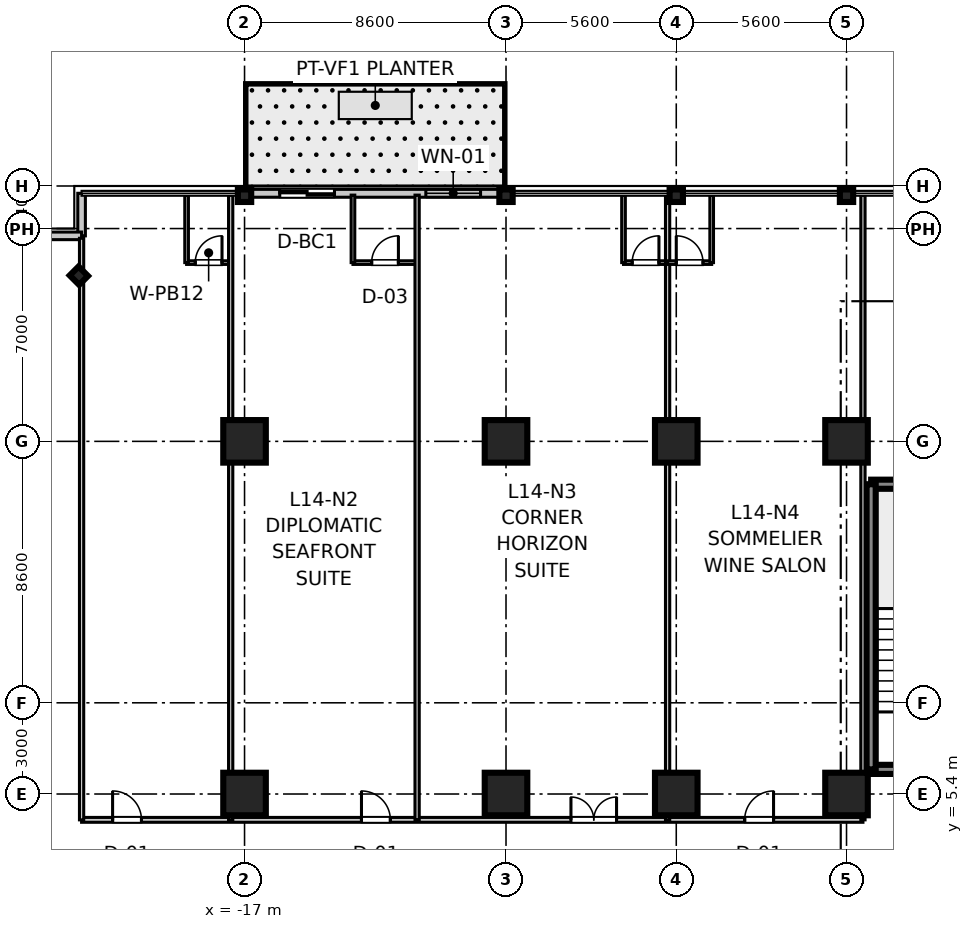
"""IFC4 building model, lengths in metres.
Left out: names, types, materials, properties, quantities, classifications, styles, units other than length and angle.
Written with IfcOpenShell. Run it as: python <this file> out.ifc"""

import sys

from ifc_helpers import new_model, si_unit, direction, frame, frame_2d, origin, origin_2d, place, context, subcontext, project, spatial, rectangle, i_section, extrude, source, transform, mapped, element, fill, save


model = new_model("IFC4")
c1 = context("Model", 3, precision=1e-05, world=origin(), true_north=direction((0.0, 1.0)))
c2 = subcontext(c1, "Body", "Model", "MODEL_VIEW")
j1 = project(units=[si_unit("LENGTHUNIT", "METRE"), si_unit("PLANEANGLEUNIT", "RADIAN")], contexts=[c1])
p1 = place(None, origin())
s1 = spatial("IfcSite", under=j1, at=p1, CompositionType="ELEMENT")
p2 = place(p1, origin())
s2 = spatial("IfcBuilding", under=s1, at=p2, CompositionType="ELEMENT")
p3 = place(p2, frame((0.0, 0.0, 61.6)))
s3 = spatial("IfcBuildingStorey", under=s2, at=p3, CompositionType="ELEMENT", Elevation=61.6)
m1 = source(origin(), c2, "Body", "SweptSolid", [
    extrude(rectangle(XDim=1.4, YDim=1.4, at=origin_2d()), origin(), (0.0, 0.0, 1.0), 3.605),
])
for number, where, z_axis, x_axis in (
    (1, (-17.0, 5.4, 0.0), (0.0, 0.0, 1.0), (1.0, 0.0, 0.0)),
    (2, (-17.0, 17.0, 0.0), (0.0, 0.0, 1.0), (1.0, 0.0, 0.0)),
    (3, (-8.4, 5.4, 0.0), (0.0, 0.0, 1.0), (1.0, 0.0, 0.0)),
    (4, (-8.4, 17.0, 0.0), (0.0, 0.0, 1.0), (1.0, 0.0, 0.0)),
    (5, (-2.8, 5.4, 0.0), (0.0, 0.0, 1.0), (1.0, 0.0, 0.0)),
    (6, (-2.8, 17.0, 0.0), (0.0, 0.0, 1.0), (1.0, 0.0, 0.0)),
    (7, (2.8, 5.4, 0.0), (0.0, 0.0, 1.0), (1.0, 0.0, 0.0)),
    (8, (2.8, 17.0, 0.0), (0.0, 0.0, 1.0), (1.0, 0.0, 0.0)),
):
    element("IfcColumn", number, at=place(p3, frame(where, z_axis=z_axis, x_axis=x_axis)), inside=s3, PredefinedType="COLUMN", context=c2, shape_type="MappedRepresentation", body=[
        mapped(m1, transform((0.0, 0.0, 0.0), scale=1.0)),
    ])
m2 = source(origin(), c2, "Body", "SweptSolid", [
    extrude(i_section(OverallWidth=0.412, OverallDepth=0.438, WebThickness=0.023, FlangeThickness=0.036, at=origin_2d()), origin(), (0.0, 0.0, 1.0), 3.605),
])
for number, where, z_axis, x_axis in (
    (9, (-17.0, 25.08, 0.0), (0.0, 0.0, 1.0), (0.0, 1.0, 0.0)),
    (10, (-8.4, 25.08, 0.0), (0.0, 0.0, 1.0), (0.0, 1.0, 0.0)),
    (11, (-2.8, 25.08, 0.0), (0.0, 0.0, 1.0), (0.0, 1.0, 0.0)),
    (12, (2.8, 25.08, 0.0), (0.0, 0.0, 1.0), (0.0, 1.0, 0.0)),
    (13, (-22.45, 22.45, 0.0), (0.0, 0.0, 1.0), (0.707, 0.707, 0.0)),
):
    element("IfcColumn", number, at=place(p3, frame(where, z_axis=z_axis, x_axis=x_axis)), inside=s3, PredefinedType="COLUMN", context=c2, shape_type="MappedRepresentation", body=[
        mapped(m2, transform((0.0, 0.0, 0.0), scale=1.0)),
    ])
m3 = source(origin(), c2, "Body", "SweptSolid", [
    extrude(rectangle(XDim=3.98, YDim=0.3, at=frame_2d((1.99, 0.0))), origin(), (0.0, 0.0, 1.0), 3.37),
])
for number, where, z_axis, x_axis in (
    (14, (3.61, 6.21, 0.0), (0.0, 0.0, 1.0), (1.0, 0.0, 0.0)),
    (15, (3.61, 15.59, 0.0), (0.0, 0.0, 1.0), (1.0, 0.0, 0.0)),
):
    element("IfcWall", number, at=place(p3, frame(where, z_axis=z_axis, x_axis=x_axis)), inside=s3, PredefinedType="SHEAR", context=c2, shape_type="MappedRepresentation", body=[
        mapped(m3, transform((0.0, 0.0, 0.0), scale=1.0)),
    ])
m4 = source(origin(), c2, "Body", "SweptSolid", [
    extrude(rectangle(XDim=9.38, YDim=0.3, at=frame_2d((4.69, 0.0))), origin(), (0.0, 0.0, 1.0), 3.37),
])
p4 = place(p3, frame((3.61, 6.21, 0.0), z_axis=(0.0, 0.0, 1.0), x_axis=(0.0, 1.0, 0.0)))
e16 = element("IfcWall", 16, at=p4, inside=s3, PredefinedType="SHEAR", context=c2, shape_type="MappedRepresentation", body=[
    mapped(m4, transform((0.0, 0.0, 0.0), scale=1.0)),
])
m5 = source(origin(), c2, "Body", "SweptSolid", [
    extrude(rectangle(XDim=1.4, YDim=0.25, at=frame_2d((0.7, 0.0))), origin(), (0.0, 0.0, 1.0), 3.37),
])
for number, where, z_axis, x_axis in (
    (17, (-22.36, 23.76, 0.0), (0.0, 0.0, 1.0), (0.0, 1.0, 0.0)),
    (18, (-23.76, 23.76, 0.0), (0.0, 0.0, 1.0), (1.0, 0.0, 0.0)),
):
    element("IfcWall", number, at=place(p3, frame(where, z_axis=z_axis, x_axis=x_axis)), inside=s3, PredefinedType="STANDARD", context=c2, shape_type="MappedRepresentation", body=[
        mapped(m5, transform((0.0, 0.0, 0.0), scale=1.0)),
    ])
m6 = source(origin(), c2, "Body", "SweptSolid", [
    extrude(rectangle(XDim=8.6, YDim=0.26, at=frame_2d((4.3, 0.0))), origin(), (0.0, 0.0, 1.0), 2.85),
])
p5 = place(p3, frame((-17.0, 25.16, 0.0), z_axis=(0.0, 0.0, 1.0), x_axis=(1.0, 0.0, 0.0)))
e19 = element("IfcWall", 19, at=p5, inside=s3, PredefinedType="STANDARD", context=c2, shape_type="MappedRepresentation", body=[
    mapped(m6, transform((0.0, 0.0, 0.0), scale=1.0)),
])
p6 = place(p5, frame((1.158, 0.0, 0.0)))
e20 = element("IfcOpeningElement", 20, at=p6, cuts=e19, PredefinedType="OPENING", context=c2, shape_type="SweptSolid", body=[
    extrude(rectangle(XDim=1.8, YDim=2.25, at=frame_2d((0.9, 1.125))), frame((0.0, 0.14, 0.0), z_axis=(0.0, -1.0, 0.0), x_axis=(1.0, 0.0, 0.0)), (0.0, 0.0, 1.0), 0.28),
])
p7 = place(p5, frame((5.963, 0.0, 0.85)))
e21 = element("IfcOpeningElement", 21, at=p7, cuts=e19, PredefinedType="OPENING", context=c2, shape_type="SweptSolid", body=[
    extrude(rectangle(XDim=1.8, YDim=1.5, at=frame_2d((0.9, 0.75))), frame((0.0, 0.14, 0.0), z_axis=(0.0, -1.0, 0.0), x_axis=(1.0, 0.0, 0.0)), (0.0, 0.0, 1.0), 0.28),
])
m7 = source(origin(), c2, "Body", "SweptSolid", [
    extrude(rectangle(XDim=25.7, YDim=0.16, at=frame_2d((12.85, 0.0))), origin(), (0.0, 0.0, 1.0), 2.71),
])
p8 = place(p3, frame((-22.36, 4.55, 0.0), z_axis=(0.0, 0.0, 1.0), x_axis=(1.0, 0.0, 0.0)))
e22 = element("IfcWall", 22, at=p8, inside=s3, PredefinedType="PARTITIONING", context=c2, shape_type="MappedRepresentation", body=[
    mapped(m7, transform((0.0, 0.0, 0.0), scale=1.0)),
])
p9 = place(p8, frame((1.02, 0.0, 0.0)))
e23 = element("IfcOpeningElement", 23, at=p9, cuts=e22, PredefinedType="OPENING", context=c2, shape_type="SweptSolid", body=[
    extrude(rectangle(XDim=0.95, YDim=2.1, at=frame_2d((0.475, 1.05))), frame((0.0, 0.09, 0.0), z_axis=(0.0, -1.0, 0.0), x_axis=(1.0, 0.0, 0.0)), (0.0, 0.0, 1.0), 0.18),
])
p10 = place(p8, frame((9.206, 0.0, 0.0)))
e24 = element("IfcOpeningElement", 24, at=p10, cuts=e22, PredefinedType="OPENING", context=c2, shape_type="SweptSolid", body=[
    extrude(rectangle(XDim=0.95, YDim=2.1, at=frame_2d((0.475, 1.05))), frame((0.0, 0.09, 0.0), z_axis=(0.0, -1.0, 0.0), x_axis=(1.0, 0.0, 0.0)), (0.0, 0.0, 1.0), 0.18),
])
p11 = place(p8, frame((16.096, 0.0, 0.0)))
e25 = element("IfcOpeningElement", 25, at=p11, cuts=e22, PredefinedType="OPENING", context=c2, shape_type="SweptSolid", body=[
    extrude(rectangle(XDim=1.5, YDim=2.15, at=frame_2d((0.75, 1.075))), frame((0.0, 0.09, 0.0), z_axis=(0.0, -1.0, 0.0), x_axis=(1.0, 0.0, 0.0)), (0.0, 0.0, 1.0), 0.18),
])
p12 = place(p8, frame((21.81, 0.0, 0.0)))
e26 = element("IfcOpeningElement", 26, at=p12, cuts=e22, PredefinedType="OPENING", context=c2, shape_type="SweptSolid", body=[
    extrude(rectangle(XDim=0.95, YDim=2.1, at=frame_2d((0.475, 1.05))), frame((0.0, 0.09, 0.0), z_axis=(0.0, -1.0, 0.0), x_axis=(1.0, 0.0, 0.0)), (0.0, 0.0, 1.0), 0.18),
])
m8 = source(origin(), c2, "Body", "SweptSolid", [
    extrude(rectangle(XDim=19.13, YDim=0.14, at=frame_2d((9.565, 0.0))), origin(), (0.0, 0.0, 1.0), 2.71),
])
p13 = place(p3, frame((-22.36, 4.55, 0.0), z_axis=(0.0, 0.0, 1.0), x_axis=(0.0, 1.0, 0.0)))
e27 = element("IfcWall", 27, at=p13, inside=s3, PredefinedType="PARTITIONING", context=c2, shape_type="MappedRepresentation", body=[
    mapped(m8, transform((0.0, 0.0, 0.0), scale=1.0)),
])
m9 = source(origin(), c2, "Body", "SweptSolid", [
    extrude(rectangle(XDim=20.55, YDim=0.14, at=frame_2d((10.275, 0.0))), origin(), (0.0, 0.0, 1.0), 2.71),
])
p14 = place(p3, frame((3.34, 4.55, 0.0), z_axis=(0.0, 0.0, 1.0), x_axis=(0.0, 1.0, 0.0)))
e28 = element("IfcWall", 28, at=p14, inside=s3, PredefinedType="PARTITIONING", context=c2, shape_type="MappedRepresentation", body=[
    mapped(m9, transform((0.0, 0.0, 0.0), scale=1.0)),
])
m10 = source(origin(), c2, "Body", "SweptSolid", [
    extrude(rectangle(XDim=1.45, YDim=0.12, at=frame_2d((0.725, 0.0))), origin(), (0.0, 0.0, 1.0), 2.71),
])
p15 = place(p3, frame((-18.906, 22.88, 0.0), z_axis=(0.0, 0.0, 1.0), x_axis=(1.0, 0.0, 0.0)))
e29 = element("IfcWall", 29, at=p15, inside=s3, PredefinedType="PARTITIONING", context=c2, shape_type="MappedRepresentation", body=[
    mapped(m10, transform((0.0, 0.0, 0.0), scale=1.0)),
])
p16 = place(p15, frame((0.285, 0.0, 0.0)))
e30 = element("IfcOpeningElement", 30, at=p16, cuts=e29, PredefinedType="OPENING", context=c2, shape_type="SweptSolid", body=[
    extrude(rectangle(XDim=0.88, YDim=2.1, at=frame_2d((0.44, 1.05))), frame((0.0, 0.07, 0.0), z_axis=(0.0, -1.0, 0.0), x_axis=(1.0, 0.0, 0.0)), (0.0, 0.0, 1.0), 0.14),
])
m11 = source(origin(), c2, "Body", "SweptSolid", [
    extrude(rectangle(XDim=2.22, YDim=0.12, at=frame_2d((1.11, 0.0))), origin(), (0.0, 0.0, 1.0), 2.71),
])
p17 = place(p3, frame((-18.906, 22.88, 0.0), z_axis=(0.0, 0.0, 1.0), x_axis=(0.0, 1.0, 0.0)))
e31 = element("IfcWall", 31, at=p17, inside=s3, PredefinedType="PARTITIONING", context=c2, shape_type="MappedRepresentation", body=[
    mapped(m11, transform((0.0, 0.0, 0.0), scale=1.0)),
])
p18 = place(p3, frame((-17.456, 4.55, 0.0), z_axis=(0.0, 0.0, 1.0), x_axis=(0.0, 1.0, 0.0)))
e32 = element("IfcWall", 32, at=p18, inside=s3, PredefinedType="PARTITIONING", context=c2, shape_type="MappedRepresentation", body=[
    mapped(m9, transform((0.0, 0.0, 0.0), scale=1.0)),
])
m12 = source(origin(), c2, "Body", "SweptSolid", [
    extrude(rectangle(XDim=2.11, YDim=0.12, at=frame_2d((1.055, 0.0))), origin(), (0.0, 0.0, 1.0), 2.71),
])
p19 = place(p3, frame((-13.434, 22.88, 0.0), z_axis=(0.0, 0.0, 1.0), x_axis=(1.0, 0.0, 0.0)))
e33 = element("IfcWall", 33, at=p19, inside=s3, PredefinedType="PARTITIONING", context=c2, shape_type="MappedRepresentation", body=[
    mapped(m12, transform((0.0, 0.0, 0.0), scale=1.0)),
])
p20 = place(p19, frame((0.615, 0.0, 0.0)))
e34 = element("IfcOpeningElement", 34, at=p20, cuts=e33, PredefinedType="OPENING", context=c2, shape_type="SweptSolid", body=[
    extrude(rectangle(XDim=0.88, YDim=2.1, at=frame_2d((0.44, 1.05))), frame((0.0, 0.07, 0.0), z_axis=(0.0, -1.0, 0.0), x_axis=(1.0, 0.0, 0.0)), (0.0, 0.0, 1.0), 0.14),
])
p21 = place(p3, frame((-13.434, 22.88, 0.0), z_axis=(0.0, 0.0, 1.0), x_axis=(0.0, 1.0, 0.0)))
e35 = element("IfcWall", 35, at=p21, inside=s3, PredefinedType="PARTITIONING", context=c2, shape_type="MappedRepresentation", body=[
    mapped(m11, transform((0.0, 0.0, 0.0), scale=1.0)),
])
p22 = place(p3, frame((-11.324, 4.55, 0.0), z_axis=(0.0, 0.0, 1.0), x_axis=(0.0, 1.0, 0.0)))
e36 = element("IfcWall", 36, at=p22, inside=s3, PredefinedType="PARTITIONING", context=c2, shape_type="MappedRepresentation", body=[
    mapped(m9, transform((0.0, 0.0, 0.0), scale=1.0)),
])
p23 = place(p3, frame((-4.535, 22.88, 0.0), z_axis=(0.0, 0.0, 1.0), x_axis=(1.0, 0.0, 0.0)))
e37 = element("IfcWall", 37, at=p23, inside=s3, PredefinedType="PARTITIONING", context=c2, shape_type="MappedRepresentation", body=[
    mapped(m10, transform((0.0, 0.0, 0.0), scale=1.0)),
])
p24 = place(p23, frame((0.285, 0.0, 0.0)))
e38 = element("IfcOpeningElement", 38, at=p24, cuts=e37, PredefinedType="OPENING", context=c2, shape_type="SweptSolid", body=[
    extrude(rectangle(XDim=0.88, YDim=2.1, at=frame_2d((0.44, 1.05))), frame((0.0, 0.07, 0.0), z_axis=(0.0, -1.0, 0.0), x_axis=(1.0, 0.0, 0.0)), (0.0, 0.0, 1.0), 0.14),
])
p25 = place(p3, frame((-4.535, 22.88, 0.0), z_axis=(0.0, 0.0, 1.0), x_axis=(0.0, 1.0, 0.0)))
e39 = element("IfcWall", 39, at=p25, inside=s3, PredefinedType="PARTITIONING", context=c2, shape_type="MappedRepresentation", body=[
    mapped(m11, transform((0.0, 0.0, 0.0), scale=1.0)),
])
p26 = place(p3, frame((-3.085, 4.55, 0.0), z_axis=(0.0, 0.0, 1.0), x_axis=(0.0, 1.0, 0.0)))
e40 = element("IfcWall", 40, at=p26, inside=s3, PredefinedType="PARTITIONING", context=c2, shape_type="MappedRepresentation", body=[
    mapped(m9, transform((0.0, 0.0, 0.0), scale=1.0)),
])
p27 = place(p3, frame((-3.085, 22.88, 0.0), z_axis=(0.0, 0.0, 1.0), x_axis=(1.0, 0.0, 0.0)))
e41 = element("IfcWall", 41, at=p27, inside=s3, PredefinedType="PARTITIONING", context=c2, shape_type="MappedRepresentation", body=[
    mapped(m10, transform((0.0, 0.0, 0.0), scale=1.0)),
])
p28 = place(p27, frame((0.285, 0.0, 0.0)))
e42 = element("IfcOpeningElement", 42, at=p28, cuts=e41, PredefinedType="OPENING", context=c2, shape_type="SweptSolid", body=[
    extrude(rectangle(XDim=0.88, YDim=2.1, at=frame_2d((0.44, 1.05))), frame((0.0, 0.07, 0.0), z_axis=(0.0, -1.0, 0.0), x_axis=(1.0, 0.0, 0.0)), (0.0, 0.0, 1.0), 0.14),
])
p29 = place(p3, frame((-1.635, 22.88, 0.0), z_axis=(0.0, 0.0, 1.0), x_axis=(0.0, 1.0, 0.0)))
e43 = element("IfcWall", 43, at=p29, inside=s3, PredefinedType="PARTITIONING", context=c2, shape_type="MappedRepresentation", body=[
    mapped(m11, transform((0.0, 0.0, 0.0), scale=1.0)),
])
m13 = source(origin(), c2, "Body", "SweptSolid", [
    extrude(rectangle(XDim=0.88, YDim=2.1, at=frame_2d((0.44, 1.05))), frame((0.0, 0.025, 0.0), z_axis=(0.0, -1.0, 0.0), x_axis=(1.0, 0.0, 0.0)), (0.0, 0.0, 1.0), 0.05),
])
p30 = place(p16, origin())
e44 = element("IfcDoor", 44, at=p30, inside=s3, OperationType="SINGLE_SWING_RIGHT", PredefinedType="DOOR", context=c2, shape_type="MappedRepresentation", body=[
    mapped(m13, transform((0.0, 0.0, 0.0), scale=1.0)),
])
fill(e30, e44)
m14 = source(origin(), c2, "Body", "SweptSolid", [
    extrude(rectangle(XDim=0.95, YDim=2.1, at=frame_2d((0.475, 1.05))), frame((0.0, 0.025, 0.0), z_axis=(0.0, -1.0, 0.0), x_axis=(1.0, 0.0, 0.0)), (0.0, 0.0, 1.0), 0.05),
])
p31 = place(p9, origin())
e45 = element("IfcDoor", 45, at=p31, inside=s3, OperationType="SINGLE_SWING_LEFT", PredefinedType="DOOR", context=c2, shape_type="MappedRepresentation", body=[
    mapped(m14, transform((0.0, 0.0, 0.0), scale=1.0)),
])
fill(e23, e45)
p32 = place(p20, origin())
e46 = element("IfcDoor", 46, at=p32, inside=s3, OperationType="SINGLE_SWING_RIGHT", PredefinedType="DOOR", context=c2, shape_type="MappedRepresentation", body=[
    mapped(m13, transform((0.0, 0.0, 0.0), scale=1.0)),
])
fill(e34, e46)
p33 = place(p10, origin())
e47 = element("IfcDoor", 47, at=p33, inside=s3, OperationType="SINGLE_SWING_LEFT", PredefinedType="DOOR", context=c2, shape_type="MappedRepresentation", body=[
    mapped(m14, transform((0.0, 0.0, 0.0), scale=1.0)),
])
fill(e24, e47)
p34 = place(p24, origin())
e48 = element("IfcDoor", 48, at=p34, inside=s3, OperationType="SINGLE_SWING_RIGHT", PredefinedType="DOOR", context=c2, shape_type="MappedRepresentation", body=[
    mapped(m13, transform((0.0, 0.0, 0.0), scale=1.0)),
])
fill(e38, e48)
m15 = source(origin(), c2, "Body", "SweptSolid", [
    extrude(rectangle(XDim=1.5, YDim=2.15, at=frame_2d((0.75, 1.075))), frame((0.0, 0.025, 0.0), z_axis=(0.0, -1.0, 0.0), x_axis=(1.0, 0.0, 0.0)), (0.0, 0.0, 1.0), 0.05),
])
p35 = place(p11, origin())
e49 = element("IfcDoor", 49, at=p35, inside=s3, OperationType="DOUBLE_DOOR_SINGLE_SWING", PredefinedType="DOOR", context=c2, shape_type="MappedRepresentation", body=[
    mapped(m15, transform((0.0, 0.0, 0.0), scale=1.0)),
])
fill(e25, e49)
p36 = place(p28, origin())
e50 = element("IfcDoor", 50, at=p36, inside=s3, OperationType="SINGLE_SWING_LEFT", PredefinedType="DOOR", context=c2, shape_type="MappedRepresentation", body=[
    mapped(m13, transform((0.0, 0.0, 0.0), scale=1.0)),
])
fill(e42, e50)
p37 = place(p12, origin())
e51 = element("IfcDoor", 51, at=p37, inside=s3, OperationType="SINGLE_SWING_RIGHT", PredefinedType="DOOR", context=c2, shape_type="MappedRepresentation", body=[
    mapped(m14, transform((0.0, 0.0, 0.0), scale=1.0)),
])
fill(e26, e51)
m16 = source(origin(), c2, "Body", "SweptSolid", [
    extrude(rectangle(XDim=1.8, YDim=2.25, at=frame_2d((0.9, 1.125))), frame((0.0, 0.025, 0.0), z_axis=(0.0, -1.0, 0.0), x_axis=(1.0, 0.0, 0.0)), (0.0, 0.0, 1.0), 0.05),
])
p38 = place(p6, origin())
e52 = element("IfcDoor", 52, at=p38, inside=s3, OperationType="DOUBLE_DOOR_SLIDING", PredefinedType="DOOR", context=c2, shape_type="MappedRepresentation", body=[
    mapped(m16, transform((0.0, 0.0, 0.0), scale=1.0)),
])
fill(e20, e52)
m17 = source(origin(), c2, "Body", "SweptSolid", [
    extrude(rectangle(XDim=1.8, YDim=1.5, at=frame_2d((0.9, 0.75))), frame((0.0, 0.03, 0.0), z_axis=(0.0, -1.0, 0.0), x_axis=(1.0, 0.0, 0.0)), (0.0, 0.0, 1.0), 0.06),
])
p39 = place(p7, origin())
e53 = element("IfcWindow", 53, at=p39, inside=s3, PartitioningType="SINGLE_PANEL", PredefinedType="WINDOW", context=c2, shape_type="MappedRepresentation", body=[
    mapped(m17, transform((0.0, 0.0, 0.0), scale=1.0)),
])
fill(e21, e53)
save(model, sys.argv[1])
